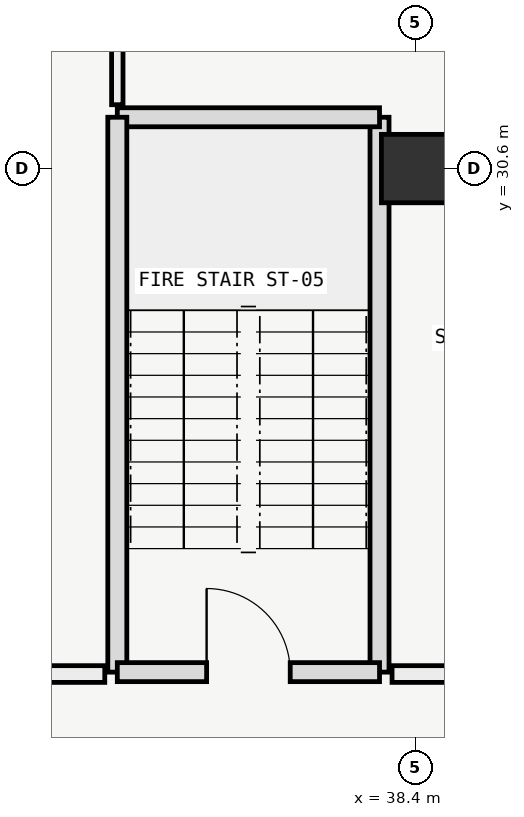
"""IFC4 building model, lengths in metres.
Left out: names, types, materials, properties, quantities, classifications, styles, units other than length and angle.
Written with IfcOpenShell. Run it as: python <this file> out.ifc"""

import sys

from ifc_helpers import new_model, si_unit, direction, frame, frame_2d, origin, origin_2d, place, context, subcontext, project, spatial, rectangle, extrude, element, fill, save


model = new_model("IFC4")
c1 = context("Model", 3, precision=1e-05, world=origin(), true_north=direction((0.0, 1.0)))
c2 = subcontext(c1, "Body", "Model", "MODEL_VIEW")
j1 = project(units=[si_unit("LENGTHUNIT", "METRE"), si_unit("PLANEANGLEUNIT", "RADIAN")], contexts=[c1])
p1 = place(None, origin())
s1 = spatial("IfcSite", under=j1, at=p1, CompositionType="ELEMENT")
p2 = place(p1, origin())
s2 = spatial("IfcBuilding", under=s1, at=p2, CompositionType="ELEMENT")
p3 = place(p2, frame((0.0, 0.0, -4.2)))
s3 = spatial("IfcBuildingStorey", under=s2, at=p3, CompositionType="ELEMENT", Elevation=-4.2)
p4 = place(p3, frame((38.4, 30.6, 0.0), z_axis=(0.0, 0.0, 1.0), x_axis=(1.0, 0.0, 0.0)))
e1 = element("IfcColumn", 1, at=p4, inside=s3, PredefinedType="COLUMN", context=c2, shape_type="SweptSolid", body=[
    extrude(rectangle(XDim=0.9, YDim=0.9, at=origin_2d()), origin(), (0.0, 0.0, 1.0), 4.2),
])
p5 = place(p3, frame((37.925, 23.975, 0.0), z_axis=(0.0, 0.0, 1.0), x_axis=(0.0, 1.0, 0.0)))
e2 = element("IfcWall", 2, at=p5, inside=s3, PredefinedType="SOLIDWALL", context=c2, shape_type="SweptSolid", body=[
    extrude(rectangle(XDim=7.3, YDim=0.25, at=frame_2d((3.65, 0.0))), origin(), (0.0, 0.0, 1.0), 3.9),
])
p6 = place(p3, frame((37.925, 31.275, 0.0), z_axis=(0.0, 0.0, 1.0), x_axis=(-1.0, 0.0, 0.0)))
e3 = element("IfcWall", 3, at=p6, inside=s3, PredefinedType="SOLIDWALL", context=c2, shape_type="SweptSolid", body=[
    extrude(rectangle(XDim=3.45, YDim=0.25, at=frame_2d((1.725, 0.0))), origin(), (0.0, 0.0, 1.0), 3.9),
])
p7 = place(p3, frame((34.475, 31.275, 0.0), z_axis=(0.0, 0.0, 1.0), x_axis=(0.0, -1.0, 0.0)))
e4 = element("IfcWall", 4, at=p7, inside=s3, PredefinedType="SOLIDWALL", context=c2, shape_type="SweptSolid", body=[
    extrude(rectangle(XDim=7.3, YDim=0.25, at=frame_2d((3.65, 0.0))), origin(), (0.0, 0.0, 1.0), 3.9),
])
p8 = place(p3, frame((34.475, 23.975, 0.0), z_axis=(0.0, 0.0, 1.0), x_axis=(1.0, 0.0, 0.0)))
e5 = element("IfcWall", 5, at=p8, inside=s3, PredefinedType="SOLIDWALL", context=c2, shape_type="SweptSolid", body=[
    extrude(rectangle(XDim=3.45, YDim=0.25, at=frame_2d((1.725, 0.0))), origin(), (0.0, 0.0, 1.0), 3.9),
])
p9 = place(p8, frame((1.175, 0.0, 0.0)))
e6 = element("IfcOpeningElement", 6, at=p9, cuts=e5, PredefinedType="OPENING", context=c2, shape_type="SweptSolid", body=[
    extrude(rectangle(XDim=1.1, YDim=2.2, at=frame_2d((0.55, 1.1))), frame((0.0, 0.135, 0.0), z_axis=(0.0, -1.0, 0.0), x_axis=(1.0, 0.0, 0.0)), (0.0, 0.0, 1.0), 0.27),
])
p10 = place(p3, frame((27.325, 23.95, 0.0), z_axis=(0.0, 0.0, 1.0), x_axis=(1.0, 0.0, 0.0)))
e7 = element("IfcWall", 7, at=p10, inside=s3, PredefinedType="PARTITIONING", context=c2, shape_type="SweptSolid", body=[
    extrude(rectangle(XDim=6.985, YDim=0.22, at=frame_2d((3.493, 0.0))), origin(), (0.0, 0.0, 1.0), 3.23),
])
p11 = place(p10, frame((4.1, 0.0, 0.0)))
e8 = element("IfcOpeningElement", 8, at=p11, cuts=e7, PredefinedType="OPENING", context=c2, shape_type="SweptSolid", body=[
    extrude(rectangle(XDim=1.5, YDim=2.2, at=frame_2d((0.75, 1.1))), frame((0.0, 0.12, 0.0), z_axis=(0.0, -1.0, 0.0), x_axis=(1.0, 0.0, 0.0)), (0.0, 0.0, 1.0), 0.24),
])
p12 = place(p3, frame((34.475, 31.44, 0.0), z_axis=(0.0, 0.0, 1.0), x_axis=(0.0, 1.0, 0.0)))
e9 = element("IfcWall", 9, at=p12, inside=s3, PredefinedType="PARTITIONING", context=c2, shape_type="SweptSolid", body=[
    extrude(rectangle(XDim=9.21, YDim=0.15, at=frame_2d((4.605, 0.0))), origin(), (0.0, 0.0, 1.0), 3.38),
])
p13 = place(p3, frame((38.09, 23.95, 0.0), z_axis=(0.0, 0.0, 1.0), x_axis=(1.0, 0.0, 0.0)))
e10 = element("IfcWall", 10, at=p13, inside=s3, PredefinedType="PARTITIONING", context=c2, shape_type="SweptSolid", body=[
    extrude(rectangle(XDim=9.76, YDim=0.22, at=frame_2d((4.88, 0.0))), origin(), (0.0, 0.0, 1.0), 3.23),
])
p14 = place(p13, frame((3.235, 0.0, 0.0)))
e11 = element("IfcOpeningElement", 11, at=p14, cuts=e10, PredefinedType="OPENING", context=c2, shape_type="SweptSolid", body=[
    extrude(rectangle(XDim=0.95, YDim=2.1, at=frame_2d((0.475, 1.05))), frame((0.0, 0.12, 0.0), z_axis=(0.0, -1.0, 0.0), x_axis=(1.0, 0.0, 0.0)), (0.0, 0.0, 1.0), 0.24),
])
p15 = place(p9, origin())
e12 = element("IfcDoor", 12, at=p15, inside=s3, OperationType="SINGLE_SWING_LEFT", PredefinedType="DOOR", context=c2, shape_type="SweptSolid", body=[
    extrude(rectangle(XDim=1.1, YDim=2.2, at=frame_2d((0.55, 1.1))), frame((0.0, 0.025, 0.0), z_axis=(0.0, -1.0, 0.0), x_axis=(1.0, 0.0, 0.0)), (0.0, 0.0, 1.0), 0.05),
])
fill(e6, e12)
save(model, sys.argv[1])
